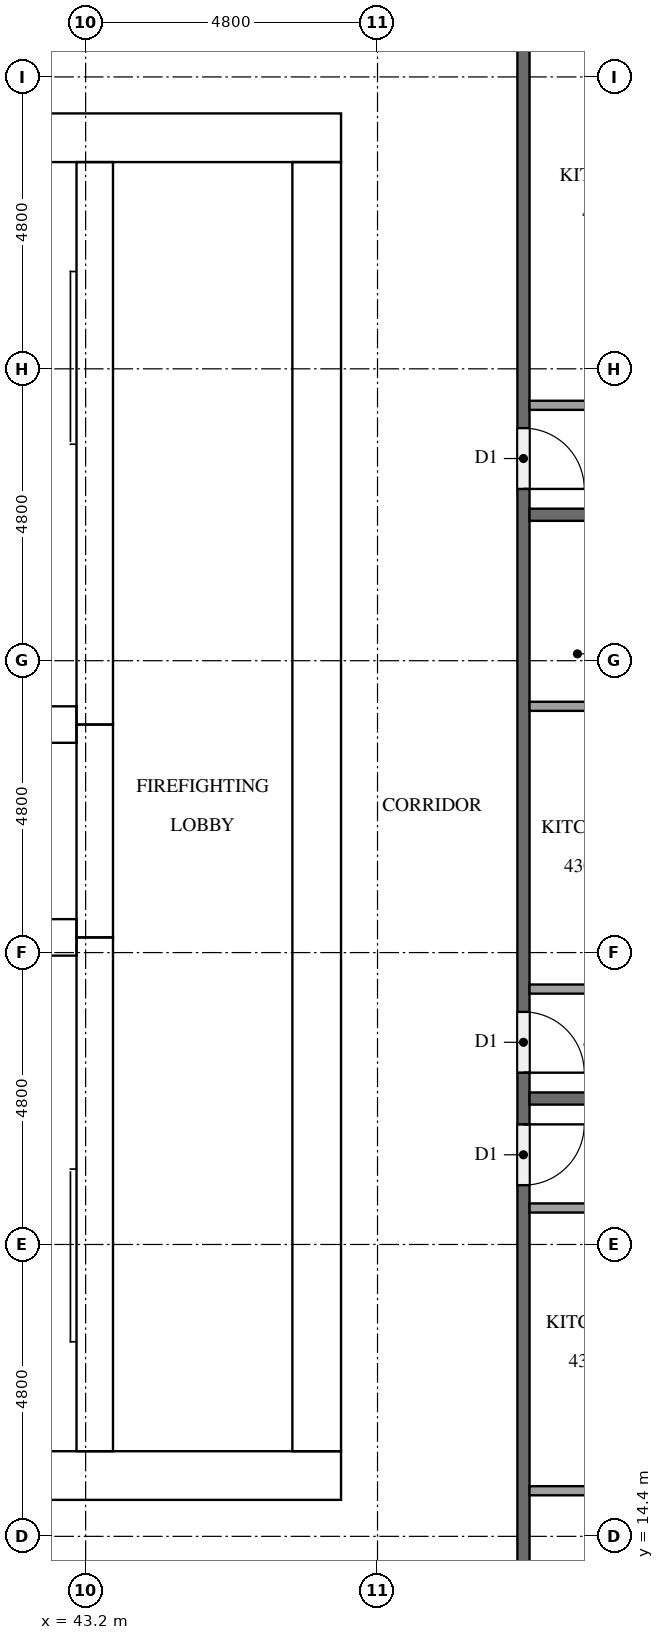
"""IFC4 building model, lengths in metres.
Left out: names, types, materials, properties, quantities, classifications, styles, units other than length and angle.
Written with IfcOpenShell. Run it as: python <this file> out.ifc"""

import sys

from ifc_helpers import new_model, si_unit, direction, frame, frame_2d, origin, place, context, subcontext, project, spatial, rectangle, extrude, element, fill, save


model = new_model("IFC4")
c1 = context("Model", 3, precision=1e-05, world=origin(), true_north=direction((0.0, 1.0)))
c2 = subcontext(c1, "Body", "Model", "MODEL_VIEW")
j1 = project(units=[si_unit("LENGTHUNIT", "METRE"), si_unit("PLANEANGLEUNIT", "RADIAN")], contexts=[c1])
p1 = place(None, origin())
s1 = spatial("IfcSite", under=j1, at=p1, CompositionType="ELEMENT")
p2 = place(p1, origin())
s2 = spatial("IfcBuilding", under=s1, at=p2, CompositionType="ELEMENT")
p3 = place(p2, frame((0.0, 0.0, 166.5)))
s3 = spatial("IfcBuildingStorey", under=s2, at=p3, CompositionType="ELEMENT", Elevation=166.5)
p4 = place(p3, frame((15.0, 15.4, 0.0), z_axis=(0.0, 0.0, 1.0), x_axis=(1.0, 0.0, 0.0)))
e1 = element("IfcWall", 1, at=p4, inside=s3, PredefinedType="SHEAR", context=c2, shape_type="SweptSolid", body=[
    extrude(rectangle(XDim=32.4, YDim=0.8, at=frame_2d((16.2, 0.0))), origin(), (0.0, 0.0, 1.0), 3.2),
])
p5 = place(p4, frame((15.3, 0.0, 0.0)))
e2 = element("IfcOpeningElement", 2, at=p5, cuts=e1, PredefinedType="OPENING", context=c2, shape_type="SweptSolid", body=[
    extrude(rectangle(XDim=1.8, YDim=2.1, at=frame_2d((0.9, 1.05))), frame((0.0, 0.41, 0.0), z_axis=(0.0, -1.0, 0.0), x_axis=(1.0, 0.0, 0.0)), (0.0, 0.0, 1.0), 0.82),
])
p6 = place(p3, frame((15.0, 37.4, 0.0), z_axis=(0.0, 0.0, 1.0), x_axis=(1.0, 0.0, 0.0)))
e3 = element("IfcWall", 3, at=p6, inside=s3, PredefinedType="SHEAR", context=c2, shape_type="SweptSolid", body=[
    extrude(rectangle(XDim=32.4, YDim=0.8, at=frame_2d((16.2, 0.0))), origin(), (0.0, 0.0, 1.0), 3.2),
])
p7 = place(p6, frame((15.3, 0.0, 0.0)))
e4 = element("IfcOpeningElement", 4, at=p7, cuts=e3, PredefinedType="OPENING", context=c2, shape_type="SweptSolid", body=[
    extrude(rectangle(XDim=1.8, YDim=2.1, at=frame_2d((0.9, 1.05))), frame((0.0, 0.41, 0.0), z_axis=(0.0, -1.0, 0.0), x_axis=(1.0, 0.0, 0.0)), (0.0, 0.0, 1.0), 0.82),
])
p8 = place(p6, frame((1.51, 0.0, 0.0)))
e5 = element("IfcOpeningElement", 5, at=p8, cuts=e3, PredefinedType="OPENING", context=c2, shape_type="SweptSolid", body=[
    extrude(rectangle(XDim=1.0, YDim=2.1, at=frame_2d((0.5, 1.05))), frame((0.0, 0.41, 0.0), z_axis=(0.0, -1.0, 0.0), x_axis=(1.0, 0.0, 0.0)), (0.0, 0.0, 1.0), 0.82),
])
p9 = place(p6, frame((5.11, 0.0, 0.0)))
e6 = element("IfcOpeningElement", 6, at=p9, cuts=e3, PredefinedType="OPENING", context=c2, shape_type="SweptSolid", body=[
    extrude(rectangle(XDim=1.0, YDim=2.1, at=frame_2d((0.5, 1.05))), frame((0.0, 0.41, 0.0), z_axis=(0.0, -1.0, 0.0), x_axis=(1.0, 0.0, 0.0)), (0.0, 0.0, 1.0), 0.82),
])
p10 = place(p3, frame((47.0, 15.8, 0.0), z_axis=(0.0, 0.0, 1.0), x_axis=(0.0, 1.0, 0.0)))
e7 = element("IfcWall", 7, at=p10, inside=s3, PredefinedType="SHEAR", context=c2, shape_type="SweptSolid", body=[
    extrude(rectangle(XDim=21.2, YDim=0.8, at=frame_2d((10.6, 0.0))), origin(), (0.0, 0.0, 1.0), 3.2),
])
p11 = place(p10, frame((10.3, 0.0, 0.0)))
e8 = element("IfcOpeningElement", 8, at=p11, cuts=e7, PredefinedType="OPENING", context=c2, shape_type="SweptSolid", body=[
    extrude(rectangle(XDim=1.2, YDim=2.1, at=frame_2d((0.6, 1.05))), frame((0.0, 0.41, 0.0), z_axis=(0.0, -1.0, 0.0), x_axis=(1.0, 0.0, 0.0)), (0.0, 0.0, 1.0), 0.82),
])
p12 = place(p3, frame((43.35, 15.8, 0.0), z_axis=(0.0, 0.0, 1.0), x_axis=(0.0, 1.0, 0.0)))
e9 = element("IfcWall", 9, at=p12, inside=s3, PredefinedType="SHEAR", context=c2, shape_type="SweptSolid", body=[
    extrude(rectangle(XDim=8.45, YDim=0.6, at=frame_2d((4.225, 0.0))), origin(), (0.0, 0.0, 1.0), 3.2),
])
p13 = place(p12, frame((0.4, 0.0, 0.0)))
e10 = element("IfcOpeningElement", 10, at=p13, cuts=e9, PredefinedType="OPENING", context=c2, shape_type="SweptSolid", body=[
    extrude(rectangle(XDim=1.2, YDim=2.1, at=frame_2d((0.6, 1.05))), frame((0.0, 0.31, 0.0), z_axis=(0.0, -1.0, 0.0), x_axis=(1.0, 0.0, 0.0)), (0.0, 0.0, 1.0), 0.62),
])
p14 = place(p3, frame((43.35, 24.25, 0.0), z_axis=(0.0, 0.0, 1.0), x_axis=(0.0, 1.0, 0.0)))
e11 = element("IfcWall", 11, at=p14, inside=s3, PredefinedType="SHEAR", context=c2, shape_type="SweptSolid", body=[
    extrude(rectangle(XDim=3.5, YDim=0.6, at=frame_2d((1.75, 0.0))), origin(), (0.0, 0.0, 1.0), 3.2),
])
p15 = place(p14, frame((1.2, 0.0, 0.0)))
e12 = element("IfcOpeningElement", 12, at=p15, cuts=e11, PredefinedType="OPENING", context=c2, shape_type="SweptSolid", body=[
    extrude(rectangle(XDim=1.1, YDim=2.1, at=frame_2d((0.55, 1.05))), frame((0.0, 0.31, 0.0), z_axis=(0.0, -1.0, 0.0), x_axis=(1.0, 0.0, 0.0)), (0.0, 0.0, 1.0), 0.62),
])
p16 = place(p3, frame((43.35, 27.75, 0.0), z_axis=(0.0, 0.0, 1.0), x_axis=(0.0, 1.0, 0.0)))
e13 = element("IfcWall", 13, at=p16, inside=s3, PredefinedType="SHEAR", context=c2, shape_type="SweptSolid", body=[
    extrude(rectangle(XDim=9.25, YDim=0.6, at=frame_2d((4.625, 0.0))), origin(), (0.0, 0.0, 1.0), 3.2),
])
p17 = place(p16, frame((7.65, 0.0, 0.0)))
e14 = element("IfcOpeningElement", 14, at=p17, cuts=e13, PredefinedType="OPENING", context=c2, shape_type="SweptSolid", body=[
    extrude(rectangle(XDim=1.2, YDim=2.1, at=frame_2d((0.6, 1.05))), frame((0.0, 0.31, 0.0), z_axis=(0.0, -1.0, 0.0), x_axis=(1.0, 0.0, 0.0)), (0.0, 0.0, 1.0), 0.62),
])
for number, where, z_axis, x_axis in (
    (15, (39.6, 24.25, 0.0), (0.0, 0.0, 1.0), (1.0, 0.0, 0.0)),
    (16, (39.6, 27.75, 0.0), (0.0, 0.0, 1.0), (1.0, 0.0, 0.0)),
):
    element("IfcWall", number, at=place(p3, frame(where, z_axis=z_axis, x_axis=x_axis)), inside=s3, PredefinedType="SHEAR", context=c2, shape_type="SweptSolid", body=[
        extrude(rectangle(XDim=3.45, YDim=0.6, at=frame_2d((1.725, 0.0))), origin(), (0.0, 0.0, 1.0), 3.2),
    ])
p18 = place(p3, frame((50.4, 40.7, 0.0), z_axis=(0.0, 0.0, 1.0), x_axis=(0.0, -1.0, 0.0)))
e17 = element("IfcWall", 17, at=p18, inside=s3, PredefinedType="PARTITIONING", context=c2, shape_type="SweptSolid", body=[
    extrude(rectangle(XDim=28.6, YDim=0.2, at=frame_2d((14.3, 0.0))), origin(), (0.0, 0.0, 1.0), 3.2),
])
p19 = place(p18, frame((19.525, 0.0, 0.0)))
e18 = element("IfcOpeningElement", 18, at=p19, cuts=e17, PredefinedType="OPENING", context=c2, shape_type="SweptSolid", body=[
    extrude(rectangle(XDim=1.0, YDim=2.1, at=frame_2d((0.5, 1.05))), frame((0.0, 0.11, 0.0), z_axis=(0.0, -1.0, 0.0), x_axis=(1.0, 0.0, 0.0)), (0.0, 0.0, 1.0), 0.22),
])
p20 = place(p18, frame((17.675, 0.0, 0.0)))
e19 = element("IfcOpeningElement", 19, at=p20, cuts=e17, PredefinedType="OPENING", context=c2, shape_type="SweptSolid", body=[
    extrude(rectangle(XDim=1.0, YDim=2.1, at=frame_2d((0.5, 1.05))), frame((0.0, 0.11, 0.0), z_axis=(0.0, -1.0, 0.0), x_axis=(1.0, 0.0, 0.0)), (0.0, 0.0, 1.0), 0.22),
])
p21 = place(p18, frame((8.075, 0.0, 0.0)))
e20 = element("IfcOpeningElement", 20, at=p21, cuts=e17, PredefinedType="OPENING", context=c2, shape_type="SweptSolid", body=[
    extrude(rectangle(XDim=1.0, YDim=2.1, at=frame_2d((0.5, 1.05))), frame((0.0, 0.11, 0.0), z_axis=(0.0, -1.0, 0.0), x_axis=(1.0, 0.0, 0.0)), (0.0, 0.0, 1.0), 0.22),
])
for number, where, z_axis, x_axis in (
    (21, (50.5, 21.6, 0.0), (0.0, 0.0, 1.0), (1.0, 0.0, 0.0)),
    (22, (50.5, 31.2, 0.0), (0.0, 0.0, 1.0), (1.0, 0.0, 0.0)),
):
    element("IfcWall", number, at=place(p3, frame(where, z_axis=z_axis, x_axis=x_axis)), inside=s3, PredefinedType="PARTITIONING", context=c2, shape_type="SweptSolid", body=[
        extrude(rectangle(XDim=7.0, YDim=0.2, at=frame_2d((3.5, 0.0))), origin(), (0.0, 0.0, 1.0), 3.2),
    ])
p22 = place(p3, frame((50.5, 15.15, 0.0), z_axis=(0.0, 0.0, 1.0), x_axis=(1.0, 0.0, 0.0)))
e23 = element("IfcWall", 23, at=p22, inside=s3, PredefinedType="PARTITIONING", context=c2, shape_type="SweptSolid", body=[
    extrude(rectangle(XDim=1.925, YDim=0.15, at=frame_2d((0.962, 0.0))), origin(), (0.0, 0.0, 1.0), 3.2),
])
p23 = place(p3, frame((50.5, 19.8, 0.0), z_axis=(0.0, 0.0, 1.0), x_axis=(1.0, 0.0, 0.0)))
e24 = element("IfcWall", 24, at=p23, inside=s3, PredefinedType="PARTITIONING", context=c2, shape_type="SweptSolid", body=[
    extrude(rectangle(XDim=2.075, YDim=0.15, at=frame_2d((1.038, 0.0))), origin(), (0.0, 0.0, 1.0), 3.2),
])
p24 = place(p3, frame((50.5, 28.05, 0.0), z_axis=(0.0, 0.0, 1.0), x_axis=(1.0, 0.0, 0.0)))
e25 = element("IfcWall", 25, at=p24, inside=s3, PredefinedType="PARTITIONING", context=c2, shape_type="SweptSolid", body=[
    extrude(rectangle(XDim=1.775, YDim=0.15, at=frame_2d((0.887, 0.0))), origin(), (0.0, 0.0, 1.0), 3.2),
])
p25 = place(p3, frame((50.5, 23.4, 0.0), z_axis=(0.0, 0.0, 1.0), x_axis=(1.0, 0.0, 0.0)))
e26 = element("IfcWall", 26, at=p25, inside=s3, PredefinedType="PARTITIONING", context=c2, shape_type="SweptSolid", body=[
    extrude(rectangle(XDim=1.925, YDim=0.15, at=frame_2d((0.962, 0.0))), origin(), (0.0, 0.0, 1.0), 3.2),
])
p26 = place(p3, frame((50.5, 33.0, 0.0), z_axis=(0.0, 0.0, 1.0), x_axis=(1.0, 0.0, 0.0)))
e27 = element("IfcWall", 27, at=p26, inside=s3, PredefinedType="PARTITIONING", context=c2, shape_type="SweptSolid", body=[
    extrude(rectangle(XDim=2.525, YDim=0.15, at=frame_2d((1.262, 0.0))), origin(), (0.0, 0.0, 1.0), 3.2),
])
p27 = place(p15, origin())
e28 = element("IfcDoor", 28, at=p27, inside=s3, OperationType="DOUBLE_DOOR_SLIDING", PredefinedType="DOOR", context=c2, shape_type="SweptSolid", body=[
    extrude(rectangle(XDim=1.1, YDim=2.1, at=frame_2d((0.55, 1.05))), frame((0.0, 0.025, 0.0), z_axis=(0.0, -1.0, 0.0), x_axis=(1.0, 0.0, 0.0)), (0.0, 0.0, 1.0), 0.05),
])
fill(e12, e28)
p28 = place(p13, origin())
e29 = element("IfcDoor", 29, at=p28, inside=s3, OperationType="SINGLE_SWING_RIGHT", PredefinedType="DOOR", context=c2, shape_type="SweptSolid", body=[
    extrude(rectangle(XDim=1.2, YDim=2.1, at=frame_2d((0.6, 1.05))), frame((0.0, 0.025, 0.0), z_axis=(0.0, -1.0, 0.0), x_axis=(1.0, 0.0, 0.0)), (0.0, 0.0, 1.0), 0.05),
])
fill(e10, e29)
p29 = place(p17, origin())
e30 = element("IfcDoor", 30, at=p29, inside=s3, OperationType="SINGLE_SWING_LEFT", PredefinedType="DOOR", context=c2, shape_type="SweptSolid", body=[
    extrude(rectangle(XDim=1.2, YDim=2.1, at=frame_2d((0.6, 1.05))), frame((0.0, 0.025, 0.0), z_axis=(0.0, -1.0, 0.0), x_axis=(1.0, 0.0, 0.0)), (0.0, 0.0, 1.0), 0.05),
])
fill(e14, e30)
p30 = place(p11, origin())
e31 = element("IfcDoor", 31, at=p30, inside=s3, OperationType="SINGLE_SWING_LEFT", PredefinedType="DOOR", context=c2, shape_type="SweptSolid", body=[
    extrude(rectangle(XDim=1.2, YDim=2.1, at=frame_2d((0.6, 1.05))), frame((0.0, 0.025, 0.0), z_axis=(0.0, -1.0, 0.0), x_axis=(1.0, 0.0, 0.0)), (0.0, 0.0, 1.0), 0.05),
])
fill(e8, e31)
p31 = place(p19, origin())
e32 = element("IfcDoor", 32, at=p31, inside=s3, OperationType="SINGLE_SWING_LEFT", PredefinedType="DOOR", context=c2, shape_type="SweptSolid", body=[
    extrude(rectangle(XDim=1.0, YDim=2.1, at=frame_2d((0.5, 1.05))), frame((0.0, 0.025, 0.0), z_axis=(0.0, -1.0, 0.0), x_axis=(1.0, 0.0, 0.0)), (0.0, 0.0, 1.0), 0.05),
])
fill(e18, e32)
p32 = place(p20, origin())
e33 = element("IfcDoor", 33, at=p32, inside=s3, OperationType="SINGLE_SWING_RIGHT", PredefinedType="DOOR", context=c2, shape_type="SweptSolid", body=[
    extrude(rectangle(XDim=1.0, YDim=2.1, at=frame_2d((0.5, 1.05))), frame((0.0, 0.025, 0.0), z_axis=(0.0, -1.0, 0.0), x_axis=(1.0, 0.0, 0.0)), (0.0, 0.0, 1.0), 0.05),
])
fill(e19, e33)
p33 = place(p21, origin())
e34 = element("IfcDoor", 34, at=p33, inside=s3, OperationType="SINGLE_SWING_RIGHT", PredefinedType="DOOR", context=c2, shape_type="SweptSolid", body=[
    extrude(rectangle(XDim=1.0, YDim=2.1, at=frame_2d((0.5, 1.05))), frame((0.0, 0.025, 0.0), z_axis=(0.0, -1.0, 0.0), x_axis=(1.0, 0.0, 0.0)), (0.0, 0.0, 1.0), 0.05),
])
fill(e20, e34)
save(model, sys.argv[1])
